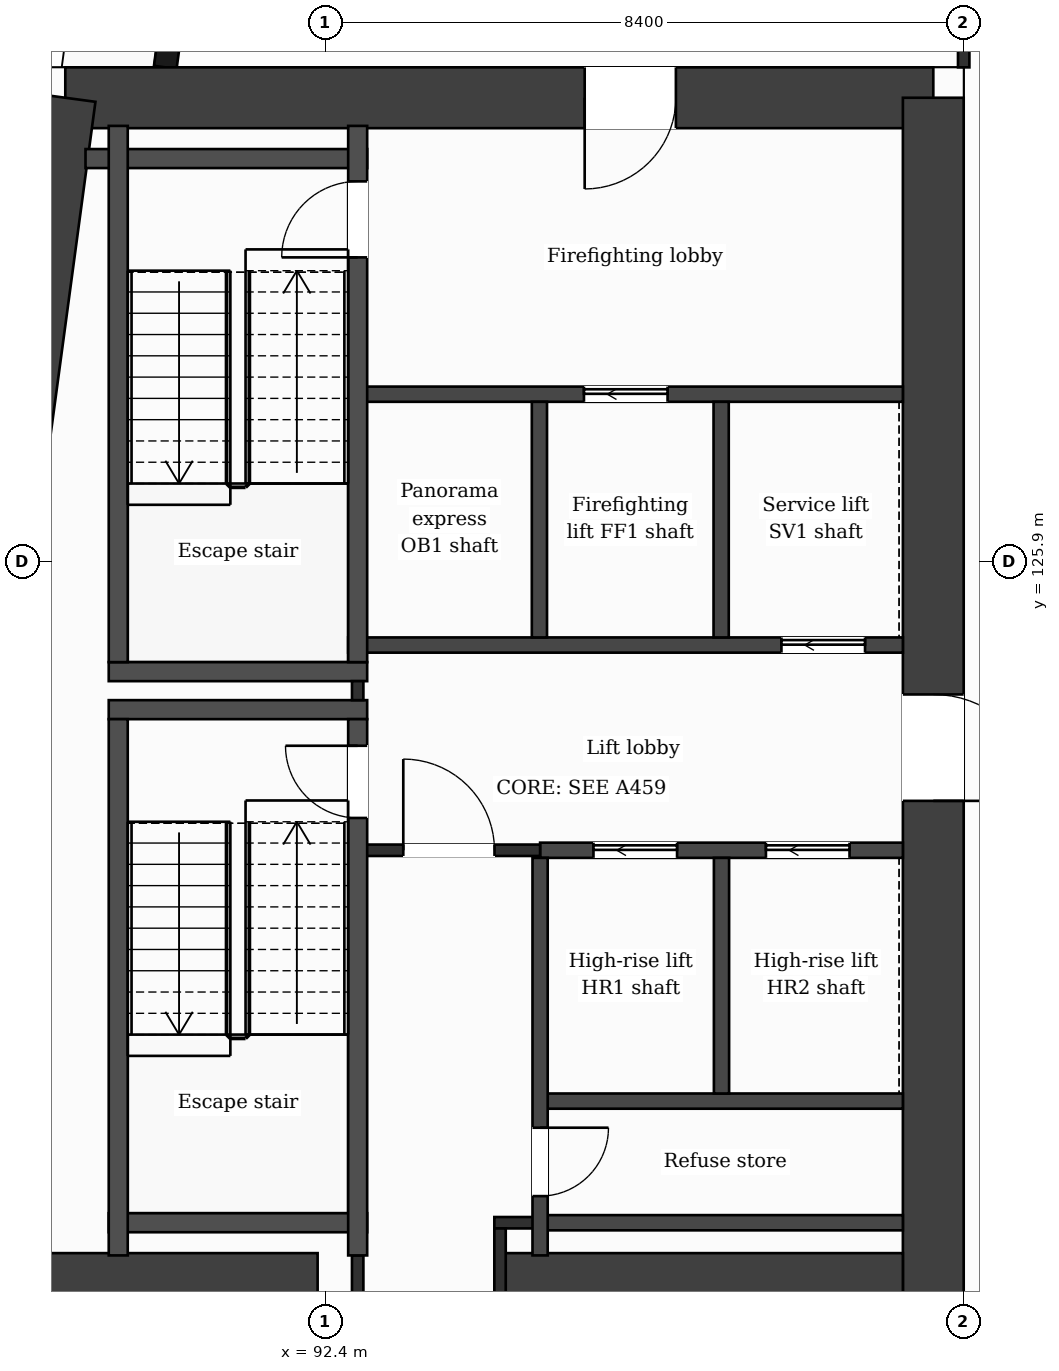
"""IFC4 building model, lengths in metres.
Left out: names, types, materials, properties, quantities, classifications, styles, units other than length and angle.
Written with IfcOpenShell. Run it as: python <this file> out.ifc"""

import sys

from ifc_helpers import new_model, si_unit, direction, frame, frame_2d, origin, place, context, subcontext, project, spatial, rectangle, extrude, element, fill, save


model = new_model("IFC4")
c1 = context("Model", 3, precision=1e-05, world=origin(), true_north=direction((0.0, 1.0)))
c2 = subcontext(c1, "Body", "Model", "MODEL_VIEW")
j1 = project(units=[si_unit("LENGTHUNIT", "METRE"), si_unit("PLANEANGLEUNIT", "RADIAN")], contexts=[c1])
p1 = place(None, origin())
s1 = spatial("IfcSite", under=j1, at=p1, CompositionType="ELEMENT")
p2 = place(p1, origin())
s2 = spatial("IfcBuilding", under=s1, at=p2, CompositionType="ELEMENT")
p3 = place(p2, frame((0.0, 0.0, 239.2)))
s3 = spatial("IfcBuildingStorey", under=s2, at=p3, CompositionType="ELEMENT", Elevation=239.2)
p4 = place(p3, frame((88.98, 132.0, 0.0), z_axis=(0.0, 0.0, 1.0), x_axis=(1.0, 0.0, 0.0)))
e1 = element("IfcWall", 1, at=p4, inside=s3, PredefinedType="SHEAR", context=c2, shape_type="SweptSolid", body=[
    extrude(rectangle(XDim=11.419, YDim=0.8, at=frame_2d((5.71, 0.0))), origin(), (0.0, 0.0, 1.0), 3.7),
])
p5 = place(p4, frame((6.833, 0.0, 0.0)))
e2 = element("IfcOpeningElement", 2, at=p5, cuts=e1, PredefinedType="OPENING", context=c2, shape_type="SweptSolid", body=[
    extrude(rectangle(XDim=1.2, YDim=2.1, at=frame_2d((0.6, 1.05))), frame((0.0, 0.41, 0.0), z_axis=(0.0, -1.0, 0.0), x_axis=(1.0, 0.0, 0.0)), (0.0, 0.0, 1.0), 0.82),
])
p6 = place(p3, frame((100.4, 132.0, 0.0), z_axis=(0.0, 0.0, 1.0), x_axis=(0.0, -1.0, 0.0)))
e3 = element("IfcWall", 3, at=p6, inside=s3, PredefinedType="SHEAR", context=c2, shape_type="SweptSolid", body=[
    extrude(rectangle(XDim=21.2, YDim=0.8, at=frame_2d((10.6, 0.0))), origin(), (0.0, 0.0, 1.0), 3.7),
])
p7 = place(p6, frame((7.85, 0.0, 0.0)))
e4 = element("IfcOpeningElement", 4, at=p7, cuts=e3, PredefinedType="OPENING", context=c2, shape_type="SweptSolid", body=[
    extrude(rectangle(XDim=1.4, YDim=2.1, at=frame_2d((0.7, 1.05))), frame((0.0, 0.41, 0.0), z_axis=(0.0, -1.0, 0.0), x_axis=(1.0, 0.0, 0.0)), (0.0, 0.0, 1.0), 0.82),
])
p8 = place(p3, frame((86.127, 110.8, 0.0), z_axis=(0.0, 0.0, 1.0), x_axis=(0.133408347329, 0.991061154956, 0.0)))
e5 = element("IfcWall", 5, at=p8, inside=s3, PredefinedType="SHEAR", context=c2, shape_type="SweptSolid", body=[
    extrude(rectangle(XDim=21.391, YDim=0.8, at=frame_2d((10.696, 0.0))), origin(), (0.0, 0.0, 1.0), 3.7),
])
p9 = place(p3, frame((87.223, 116.4, 0.0), z_axis=(0.0, 0.0, 1.0), x_axis=(1.0, 0.0, 0.0)))
e6 = element("IfcWall", 6, at=p9, inside=s3, PredefinedType="SHEAR", context=c2, shape_type="SweptSolid", body=[
    extrude(rectangle(XDim=5.077, YDim=0.8, at=frame_2d((2.539, 0.0))), origin(), (0.0, 0.0, 1.0), 3.7),
])
p10 = place(p3, frame((94.7, 116.4, 0.0), z_axis=(0.0, 0.0, 1.0), x_axis=(1.0, 0.0, 0.0)))
e7 = element("IfcWall", 7, at=p10, inside=s3, PredefinedType="SHEAR", context=c2, shape_type="SweptSolid", body=[
    extrude(rectangle(XDim=5.3, YDim=0.8, at=frame_2d((2.65, 0.0))), origin(), (0.0, 0.0, 1.0), 3.7),
])
p11 = place(p3, frame((91.177, 138.95, 0.0), z_axis=(0.0, 0.0, 1.0), x_axis=(-0.133426664613, -0.991058689065, 0.0)))
e8 = element("IfcWall", 8, at=p11, inside=s3, PredefinedType="SOLIDWALL", context=c2, shape_type="SweptSolid", body=[
    extrude(rectangle(XDim=6.609, YDim=0.3, at=frame_2d((3.305, 0.0))), origin(), (0.0, 0.0, 1.0), 3.38),
])
p12 = place(p11, frame((1.039, 0.0, 0.9)))
e9 = element("IfcOpeningElement", 9, at=p12, cuts=e8, PredefinedType="OPENING", context=c2, shape_type="SweptSolid", body=[
    extrude(rectangle(XDim=1.2, YDim=2.1, at=frame_2d((0.6, 1.05))), frame((0.0, 0.16, 0.0), z_axis=(0.0, -1.0, 0.0), x_axis=(1.0, 0.0, 0.0)), (0.0, 0.0, 1.0), 0.32),
])
p13 = place(p11, frame((4.294, 0.0, 0.0)))
e10 = element("IfcOpeningElement", 10, at=p13, cuts=e8, PredefinedType="OPENING", context=c2, shape_type="SweptSolid", body=[
    extrude(rectangle(XDim=1.2, YDim=2.4, at=frame_2d((0.6, 1.2))), frame((0.0, 0.16, 0.0), z_axis=(0.0, -1.0, 0.0), x_axis=(1.0, 0.0, 0.0)), (0.0, 0.0, 1.0), 0.32),
])
p14 = place(p3, frame((95.227, 117.2, 0.0), z_axis=(0.0, 0.0, 1.0), x_axis=(1.0, 0.0, 0.0)))
e11 = element("IfcWall", 11, at=p14, inside=s3, PredefinedType="PARTITIONING", context=c2, shape_type="SweptSolid", body=[
    extrude(rectangle(XDim=4.773, YDim=0.2, at=frame_2d((2.386, 0.0))), origin(), (0.0, 0.0, 1.0), 3.38),
])
p15 = place(p3, frame((94.625, 117.2, 0.0), z_axis=(0.0, 0.0, 1.0), x_axis=(1.0, 0.0, 0.0)))
e12 = element("IfcWall", 12, at=p15, inside=s3, PredefinedType="PARTITIONING", context=c2, shape_type="SweptSolid", body=[
    extrude(rectangle(XDim=0.602, YDim=0.15, at=frame_2d((0.301, 0.0))), origin(), (0.0, 0.0, 1.0), 3.38),
])
p16 = place(p3, frame((89.552, 117.2, 0.0), z_axis=(0.0, 0.0, 1.0), x_axis=(1.0, 0.0, 0.0)))
e13 = element("IfcWall", 13, at=p16, inside=s3, PredefinedType="PARTITIONING", context=c2, shape_type="SweptSolid", body=[
    extrude(rectangle(XDim=3.4, YDim=0.25, at=frame_2d((1.7, 0.0))), origin(), (0.0, 0.0, 1.0), 3.38),
])
p17 = place(p3, frame((95.227, 118.8, 0.0), z_axis=(0.0, 0.0, 1.0), x_axis=(1.0, 0.0, 0.0)))
e14 = element("IfcWall", 14, at=p17, inside=s3, PredefinedType="PARTITIONING", context=c2, shape_type="SweptSolid", body=[
    extrude(rectangle(XDim=4.773, YDim=0.2, at=frame_2d((2.386, 0.0))), origin(), (0.0, 0.0, 1.0), 3.38),
])
p18 = place(p3, frame((95.227, 122.1, 0.0), z_axis=(0.0, 0.0, 1.0), x_axis=(1.0, 0.0, 0.0)))
e15 = element("IfcWall", 15, at=p18, inside=s3, PredefinedType="PARTITIONING", context=c2, shape_type="SweptSolid", body=[
    extrude(rectangle(XDim=4.773, YDim=0.2, at=frame_2d((2.386, 0.0))), origin(), (0.0, 0.0, 1.0), 3.38),
])
p19 = place(p18, frame((0.702, 0.0, 0.0)))
e16 = element("IfcOpeningElement", 16, at=p19, cuts=e15, PredefinedType="OPENING", context=c2, shape_type="SweptSolid", body=[
    extrude(rectangle(XDim=1.1, YDim=2.1, at=frame_2d((0.55, 1.05))), frame((0.0, 0.11, 0.0), z_axis=(0.0, -1.0, 0.0), x_axis=(1.0, 0.0, 0.0)), (0.0, 0.0, 1.0), 0.22),
])
p20 = place(p18, frame((2.971, 0.0, 0.0)))
e17 = element("IfcOpeningElement", 17, at=p20, cuts=e15, PredefinedType="OPENING", context=c2, shape_type="SweptSolid", body=[
    extrude(rectangle(XDim=1.1, YDim=2.1, at=frame_2d((0.55, 1.05))), frame((0.0, 0.11, 0.0), z_axis=(0.0, -1.0, 0.0), x_axis=(1.0, 0.0, 0.0)), (0.0, 0.0, 1.0), 0.22),
])
p21 = place(p3, frame((92.827, 122.1, 0.0), z_axis=(0.0, 0.0, 1.0), x_axis=(1.0, 0.0, 0.0)))
e18 = element("IfcWall", 18, at=p21, inside=s3, PredefinedType="PARTITIONING", context=c2, shape_type="SweptSolid", body=[
    extrude(rectangle(XDim=2.4, YDim=0.15, at=frame_2d((1.2, 0.0))), origin(), (0.0, 0.0, 1.0), 3.38),
])
p22 = place(p21, frame((0.6, 0.0, 0.0)))
e19 = element("IfcOpeningElement", 19, at=p22, cuts=e18, PredefinedType="OPENING", context=c2, shape_type="SweptSolid", body=[
    extrude(rectangle(XDim=1.2, YDim=2.1, at=frame_2d((0.6, 1.05))), frame((0.0, 0.085, 0.0), z_axis=(0.0, -1.0, 0.0), x_axis=(1.0, 0.0, 0.0)), (0.0, 0.0, 1.0), 0.17),
])
for number, where, z_axis, x_axis in (
    (20, (89.552, 123.95, 0.0), (0.0, 0.0, 1.0), (1.0, 0.0, 0.0)),
    (21, (89.552, 124.45, 0.0), (0.0, 0.0, 1.0), (1.0, 0.0, 0.0)),
):
    element("IfcWall", number, at=place(p3, frame(where, z_axis=z_axis, x_axis=x_axis)), inside=s3, PredefinedType="PARTITIONING", context=c2, shape_type="SweptSolid", body=[
        extrude(rectangle(XDim=3.4, YDim=0.25, at=frame_2d((1.7, 0.0))), origin(), (0.0, 0.0, 1.0), 3.38),
    ])
p23 = place(p3, frame((92.702, 124.8, 0.0), z_axis=(0.0, 0.0, 1.0), x_axis=(1.0, 0.0, 0.0)))
e22 = element("IfcWall", 22, at=p23, inside=s3, PredefinedType="PARTITIONING", context=c2, shape_type="SweptSolid", body=[
    extrude(rectangle(XDim=7.298, YDim=0.2, at=frame_2d((3.649, 0.0))), origin(), (0.0, 0.0, 1.0), 3.38),
])
p24 = place(p23, frame((5.7, 0.0, 0.0)))
e23 = element("IfcOpeningElement", 23, at=p24, cuts=e22, PredefinedType="OPENING", context=c2, shape_type="SweptSolid", body=[
    extrude(rectangle(XDim=1.1, YDim=2.1, at=frame_2d((0.55, 1.05))), frame((0.0, 0.11, 0.0), z_axis=(0.0, -1.0, 0.0), x_axis=(1.0, 0.0, 0.0)), (0.0, 0.0, 1.0), 0.22),
])
p25 = place(p3, frame((92.827, 128.1, 0.0), z_axis=(0.0, 0.0, 1.0), x_axis=(1.0, 0.0, 0.0)))
e24 = element("IfcWall", 24, at=p25, inside=s3, PredefinedType="PARTITIONING", context=c2, shape_type="SweptSolid", body=[
    extrude(rectangle(XDim=7.173, YDim=0.2, at=frame_2d((3.586, 0.0))), origin(), (0.0, 0.0, 1.0), 3.38),
])
p26 = place(p25, frame((2.977, 0.0, 0.0)))
e25 = element("IfcOpeningElement", 25, at=p26, cuts=e24, PredefinedType="OPENING", context=c2, shape_type="SweptSolid", body=[
    extrude(rectangle(XDim=1.1, YDim=2.1, at=frame_2d((0.55, 1.05))), frame((0.0, 0.11, 0.0), z_axis=(0.0, -1.0, 0.0), x_axis=(1.0, 0.0, 0.0)), (0.0, 0.0, 1.0), 0.22),
])
p27 = place(p3, frame((89.246, 131.2, 0.0), z_axis=(0.0, 0.0, 1.0), x_axis=(1.0, 0.0, 0.0)))
e26 = element("IfcWall", 26, at=p27, inside=s3, PredefinedType="PARTITIONING", context=c2, shape_type="SweptSolid", body=[
    extrude(rectangle(XDim=3.706, YDim=0.25, at=frame_2d((1.853, 0.0))), origin(), (0.0, 0.0, 1.0), 3.38),
])
for number, where, z_axis, x_axis in (
    (27, (89.677, 116.77, 0.0), (0.0, 0.0, 1.0), (0.0, 1.0, 0.0)),
    (28, (89.677, 124.575, 0.0), (0.0, 0.0, 1.0), (0.0, 1.0, 0.0)),
):
    element("IfcWall", number, at=place(p3, frame(where, z_axis=z_axis, x_axis=x_axis)), inside=s3, PredefinedType="PARTITIONING", context=c2, shape_type="SweptSolid", body=[
        extrude(rectangle(XDim=7.055, YDim=0.25, at=frame_2d((3.527, 0.0))), origin(), (0.0, 0.0, 1.0), 3.38),
    ])
p28 = place(p3, frame((92.827, 116.0, 0.0), z_axis=(0.0, 0.0, 1.0), x_axis=(0.0, 1.0, 0.0)))
e29 = element("IfcWall", 29, at=p28, inside=s3, PredefinedType="PARTITIONING", context=c2, shape_type="SweptSolid", body=[
    extrude(rectangle(XDim=0.77, YDim=0.15, at=frame_2d((0.385, 0.0))), origin(), (0.0, 0.0, 1.0), 3.38),
])
p29 = place(p3, frame((92.827, 124.075, 0.0), z_axis=(0.0, 0.0, 1.0), x_axis=(0.0, 1.0, 0.0)))
e30 = element("IfcWall", 30, at=p29, inside=s3, PredefinedType="PARTITIONING", context=c2, shape_type="SweptSolid", body=[
    extrude(rectangle(XDim=0.25, YDim=0.15, at=frame_2d((0.125, 0.0))), origin(), (0.0, 0.0, 1.0), 3.38),
])
p30 = place(p3, frame((92.827, 116.77, 0.0), z_axis=(0.0, 0.0, 1.0), x_axis=(0.0, 1.0, 0.0)))
e31 = element("IfcWall", 31, at=p30, inside=s3, PredefinedType="PARTITIONING", context=c2, shape_type="SweptSolid", body=[
    extrude(rectangle(XDim=7.055, YDim=0.25, at=frame_2d((3.527, 0.0))), origin(), (0.0, 0.0, 1.0), 3.38),
])
p31 = place(p30, frame((5.755, 0.0, 0.0)))
e32 = element("IfcOpeningElement", 32, at=p31, cuts=e31, PredefinedType="OPENING", context=c2, shape_type="SweptSolid", body=[
    extrude(rectangle(XDim=0.95, YDim=2.1, at=frame_2d((0.475, 1.05))), frame((0.0, 0.135, 0.0), z_axis=(0.0, -1.0, 0.0), x_axis=(1.0, 0.0, 0.0)), (0.0, 0.0, 1.0), 0.27),
])
p32 = place(p3, frame((92.827, 124.575, 0.0), z_axis=(0.0, 0.0, 1.0), x_axis=(0.0, 1.0, 0.0)))
e33 = element("IfcWall", 33, at=p32, inside=s3, PredefinedType="PARTITIONING", context=c2, shape_type="SweptSolid", body=[
    extrude(rectangle(XDim=7.055, YDim=0.25, at=frame_2d((3.527, 0.0))), origin(), (0.0, 0.0, 1.0), 3.38),
])
p33 = place(p32, frame((5.325, 0.0, 0.0)))
e34 = element("IfcOpeningElement", 34, at=p33, cuts=e33, PredefinedType="OPENING", context=c2, shape_type="SweptSolid", body=[
    extrude(rectangle(XDim=1.0, YDim=2.1, at=frame_2d((0.5, 1.05))), frame((0.0, 0.135, 0.0), z_axis=(0.0, -1.0, 0.0), x_axis=(1.0, 0.0, 0.0)), (0.0, 0.0, 1.0), 0.27),
])
p34 = place(p3, frame((94.7, 116.0, 0.0), z_axis=(0.0, 0.0, 1.0), x_axis=(0.0, 1.0, 0.0)))
e35 = element("IfcWall", 35, at=p34, inside=s3, PredefinedType="PARTITIONING", context=c2, shape_type="SweptSolid", body=[
    extrude(rectangle(XDim=1.125, YDim=0.15, at=frame_2d((0.562, 0.0))), origin(), (0.0, 0.0, 1.0), 3.38),
])
p35 = place(p3, frame((95.218, 124.9, 0.0), z_axis=(0.0, 0.0, 1.0), x_axis=(0.0, 1.0, 0.0)))
e36 = element("IfcWall", 36, at=p35, inside=s3, PredefinedType="PARTITIONING", context=c2, shape_type="SweptSolid", body=[
    extrude(rectangle(XDim=3.1, YDim=0.2, at=frame_2d((1.55, 0.0))), origin(), (0.0, 0.0, 1.0), 3.38),
])
p36 = place(p3, frame((95.227, 116.77, 0.0), z_axis=(0.0, 0.0, 1.0), x_axis=(0.0, 1.0, 0.0)))
e37 = element("IfcWall", 37, at=p36, inside=s3, PredefinedType="PARTITIONING", context=c2, shape_type="SweptSolid", body=[
    extrude(rectangle(XDim=5.23, YDim=0.2, at=frame_2d((2.615, 0.0))), origin(), (0.0, 0.0, 1.0), 3.38),
])
p37 = place(p36, frame((0.78, 0.0, 0.0)))
e38 = element("IfcOpeningElement", 38, at=p37, cuts=e37, PredefinedType="OPENING", context=c2, shape_type="SweptSolid", body=[
    extrude(rectangle(XDim=0.9, YDim=2.1, at=frame_2d((0.45, 1.05))), frame((0.0, 0.11, 0.0), z_axis=(0.0, -1.0, 0.0), x_axis=(1.0, 0.0, 0.0)), (0.0, 0.0, 1.0), 0.22),
])
for number, where, z_axis, x_axis in (
    (39, (97.609, 124.9, 0.0), (0.0, 0.0, 1.0), (0.0, 1.0, 0.0)),
    (40, (97.614, 118.9, 0.0), (0.0, 0.0, 1.0), (0.0, 1.0, 0.0)),
):
    element("IfcWall", number, at=place(p3, frame(where, z_axis=z_axis, x_axis=x_axis)), inside=s3, PredefinedType="PARTITIONING", context=c2, shape_type="SweptSolid", body=[
        extrude(rectangle(XDim=3.1, YDim=0.2, at=frame_2d((1.55, 0.0))), origin(), (0.0, 0.0, 1.0), 3.38),
    ])
p38 = place(p3, frame((100.8, 132.4, 0.0), z_axis=(0.0, 0.0, 1.0), x_axis=(0.0, 1.0, 0.0)))
e41 = element("IfcWall", 41, at=p38, inside=s3, PredefinedType="PARTITIONING", context=c2, shape_type="SweptSolid", body=[
    extrude(rectangle(XDim=1.325, YDim=0.15, at=frame_2d((0.663, 0.0))), origin(), (0.0, 0.0, 1.0), 3.38),
])
p39 = place(p22, origin())
e42 = element("IfcDoor", 42, at=p39, inside=s3, OperationType="SINGLE_SWING_LEFT", PredefinedType="DOOR", context=c2, shape_type="SweptSolid", body=[
    extrude(rectangle(XDim=1.2, YDim=2.1, at=frame_2d((0.6, 1.05))), frame((0.0, 0.025, 0.0), z_axis=(0.0, -1.0, 0.0), x_axis=(1.0, 0.0, 0.0)), (0.0, 0.0, 1.0), 0.05),
])
fill(e19, e42)
p40 = place(p19, origin())
e43 = element("IfcDoor", 43, at=p40, inside=s3, OperationType="SLIDING_TO_LEFT", PredefinedType="DOOR", context=c2, shape_type="SweptSolid", body=[
    extrude(rectangle(XDim=1.1, YDim=2.1, at=frame_2d((0.55, 1.05))), frame((0.0, 0.025, 0.0), z_axis=(0.0, -1.0, 0.0), x_axis=(1.0, 0.0, 0.0)), (0.0, 0.0, 1.0), 0.05),
])
fill(e16, e43)
p41 = place(p20, origin())
e44 = element("IfcDoor", 44, at=p41, inside=s3, OperationType="SLIDING_TO_LEFT", PredefinedType="DOOR", context=c2, shape_type="SweptSolid", body=[
    extrude(rectangle(XDim=1.1, YDim=2.1, at=frame_2d((0.55, 1.05))), frame((0.0, 0.025, 0.0), z_axis=(0.0, -1.0, 0.0), x_axis=(1.0, 0.0, 0.0)), (0.0, 0.0, 1.0), 0.05),
])
fill(e17, e44)
p42 = place(p26, origin())
e45 = element("IfcDoor", 45, at=p42, inside=s3, OperationType="SLIDING_TO_LEFT", PredefinedType="DOOR", context=c2, shape_type="SweptSolid", body=[
    extrude(rectangle(XDim=1.1, YDim=2.1, at=frame_2d((0.55, 1.05))), frame((0.0, 0.025, 0.0), z_axis=(0.0, -1.0, 0.0), x_axis=(1.0, 0.0, 0.0)), (0.0, 0.0, 1.0), 0.05),
])
fill(e25, e45)
p43 = place(p24, origin())
e46 = element("IfcDoor", 46, at=p43, inside=s3, OperationType="SLIDING_TO_LEFT", PredefinedType="DOOR", context=c2, shape_type="SweptSolid", body=[
    extrude(rectangle(XDim=1.1, YDim=2.1, at=frame_2d((0.55, 1.05))), frame((0.0, 0.025, 0.0), z_axis=(0.0, -1.0, 0.0), x_axis=(1.0, 0.0, 0.0)), (0.0, 0.0, 1.0), 0.05),
])
fill(e23, e46)
p44 = place(p31, origin())
e47 = element("IfcDoor", 47, at=p44, inside=s3, OperationType="SINGLE_SWING_RIGHT", PredefinedType="DOOR", context=c2, shape_type="SweptSolid", body=[
    extrude(rectangle(XDim=0.95, YDim=2.1, at=frame_2d((0.475, 1.05))), frame((0.0, 0.025, 0.0), z_axis=(0.0, -1.0, 0.0), x_axis=(1.0, 0.0, 0.0)), (0.0, 0.0, 1.0), 0.05),
])
fill(e32, e47)
p45 = place(p33, origin())
e48 = element("IfcDoor", 48, at=p45, inside=s3, OperationType="SINGLE_SWING_LEFT", PredefinedType="DOOR", context=c2, shape_type="SweptSolid", body=[
    extrude(rectangle(XDim=1.0, YDim=2.1, at=frame_2d((0.5, 1.05))), frame((0.0, 0.025, 0.0), z_axis=(0.0, -1.0, 0.0), x_axis=(1.0, 0.0, 0.0)), (0.0, 0.0, 1.0), 0.05),
])
fill(e34, e48)
p46 = place(p37, origin())
e49 = element("IfcDoor", 49, at=p46, inside=s3, OperationType="SINGLE_SWING_RIGHT", PredefinedType="DOOR", context=c2, shape_type="SweptSolid", body=[
    extrude(rectangle(XDim=0.9, YDim=2.1, at=frame_2d((0.45, 1.05))), frame((0.0, 0.025, 0.0), z_axis=(0.0, -1.0, 0.0), x_axis=(1.0, 0.0, 0.0)), (0.0, 0.0, 1.0), 0.05),
])
fill(e38, e49)
p47 = place(p5, origin())
e50 = element("IfcDoor", 50, at=p47, inside=s3, OperationType="SINGLE_SWING_LEFT", PredefinedType="DOOR", context=c2, shape_type="SweptSolid", body=[
    extrude(rectangle(XDim=1.2, YDim=2.1, at=frame_2d((0.6, 1.05))), frame((0.0, 0.025, 0.0), z_axis=(0.0, -1.0, 0.0), x_axis=(1.0, 0.0, 0.0)), (0.0, 0.0, 1.0), 0.05),
])
fill(e2, e50)
p48 = place(p7, origin())
e51 = element("IfcDoor", 51, at=p48, inside=s3, OperationType="SINGLE_SWING_RIGHT", PredefinedType="DOOR", context=c2, shape_type="SweptSolid", body=[
    extrude(rectangle(XDim=1.4, YDim=2.1, at=frame_2d((0.7, 1.05))), frame((0.0, 0.025, 0.0), z_axis=(0.0, -1.0, 0.0), x_axis=(1.0, 0.0, 0.0)), (0.0, 0.0, 1.0), 0.05),
])
fill(e4, e51)
save(model, sys.argv[1])
